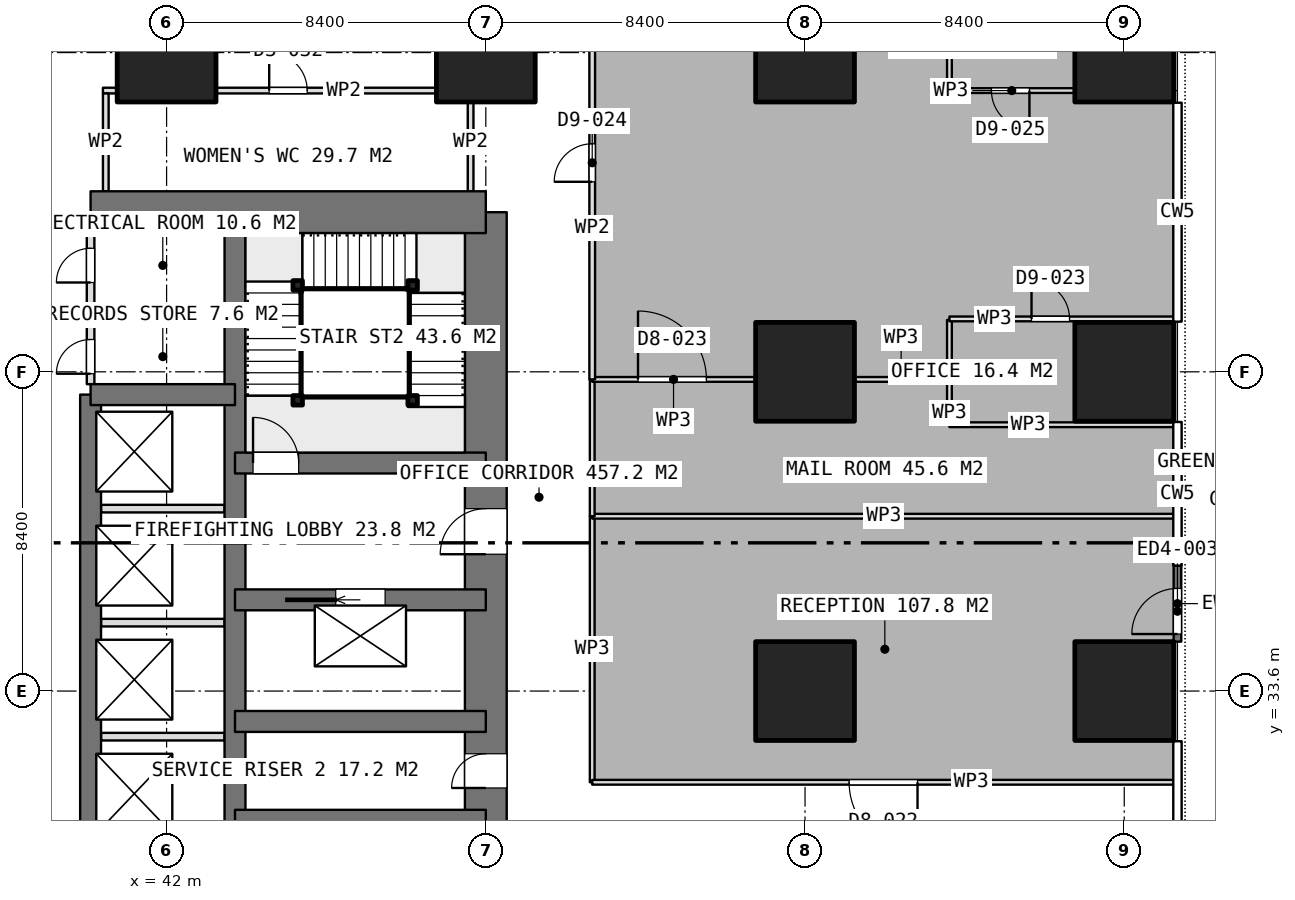
"""IFC4 building model, lengths in metres.
Left out: names, types, materials, properties, quantities, classifications, styles, units other than length and angle.
Written with IfcOpenShell. Run it as: python <this file> out.ifc"""

import sys

from ifc_helpers import new_model, si_unit, direction, frame, frame_2d, origin, origin_2d, place, context, subcontext, project, spatial, rectangle, extrude, element, fill, save


model = new_model("IFC4")
c1 = context("Model", 3, precision=1e-05, world=origin(), true_north=direction((0.0, 1.0)))
c2 = subcontext(c1, "Body", "Model", "MODEL_VIEW")
j1 = project(units=[si_unit("LENGTHUNIT", "METRE"), si_unit("PLANEANGLEUNIT", "RADIAN")], contexts=[c1])
p1 = place(None, origin())
s1 = spatial("IfcSite", under=j1, at=p1, CompositionType="ELEMENT")
p2 = place(p1, origin())
s2 = spatial("IfcBuilding", under=s1, at=p2, CompositionType="ELEMENT")
p3 = place(p2, frame((0.0, 0.0, 25.4)))
s3 = spatial("IfcBuildingStorey", under=s2, at=p3, CompositionType="ELEMENT", Elevation=25.4)
p4 = place(p3, frame((40.0, 46.2, 0.0), z_axis=(0.0, 0.0, 1.0), x_axis=(1.0, 0.0, 0.0)))
e1 = element("IfcWall", 1, at=p4, inside=s3, PredefinedType="SHEAR", context=c2, shape_type="SweptSolid", body=[
    extrude(rectangle(XDim=10.4, YDim=1.1, at=frame_2d((5.2, 0.0))), origin(), (0.0, 0.0, 1.0), 3.75),
])
p5 = place(p3, frame((50.4, 21.0, 0.0), z_axis=(0.0, 0.0, 1.0), x_axis=(0.0, 1.0, 0.0)))
e2 = element("IfcWall", 2, at=p5, inside=s3, PredefinedType="SHEAR", context=c2, shape_type="SweptSolid", body=[
    extrude(rectangle(XDim=25.2, YDim=1.1, at=frame_2d((12.6, 0.0))), origin(), (0.0, 0.0, 1.0), 3.75),
])
p6 = place(p5, frame((16.2, 0.0, 0.0)))
e3 = element("IfcOpeningElement", 3, at=p6, cuts=e2, PredefinedType="OPENING", context=c2, shape_type="SweptSolid", body=[
    extrude(rectangle(XDim=1.2, YDim=2.1, at=frame_2d((0.6, 1.05))), frame((0.0, 0.56, 0.0), z_axis=(0.0, -1.0, 0.0), x_axis=(1.0, 0.0, 0.0)), (0.0, 0.0, 1.0), 1.12),
])
p7 = place(p5, frame((10.05, 0.0, 0.0)))
e4 = element("IfcOpeningElement", 4, at=p7, cuts=e2, PredefinedType="OPENING", context=c2, shape_type="SweptSolid", body=[
    extrude(rectangle(XDim=0.9, YDim=2.1, at=frame_2d((0.45, 1.05))), frame((0.0, 0.56, 0.0), z_axis=(0.0, -1.0, 0.0), x_axis=(1.0, 0.0, 0.0)), (0.0, 0.0, 1.0), 1.12),
])
p8 = place(p5, frame((7.45, 0.0, 0.0)))
e5 = element("IfcOpeningElement", 5, at=p8, cuts=e2, PredefinedType="OPENING", context=c2, shape_type="SweptSolid", body=[
    extrude(rectangle(XDim=0.9, YDim=2.1, at=frame_2d((0.45, 1.05))), frame((0.0, 0.56, 0.0), z_axis=(0.0, -1.0, 0.0), x_axis=(1.0, 0.0, 0.0)), (0.0, 0.0, 1.0), 1.12),
])
p9 = place(p5, frame((0.75, 0.0, 0.0)))
e6 = element("IfcOpeningElement", 6, at=p9, cuts=e2, PredefinedType="OPENING", context=c2, shape_type="SweptSolid", body=[
    extrude(rectangle(XDim=1.2, YDim=2.1, at=frame_2d((0.6, 1.05))), frame((0.0, 0.56, 0.0), z_axis=(0.0, -1.0, 0.0), x_axis=(1.0, 0.0, 0.0)), (0.0, 0.0, 1.0), 1.12),
])
p10 = place(p3, frame((43.8, 21.0, 0.0), z_axis=(0.0, 0.0, 1.0), x_axis=(0.0, 1.0, 0.0)))
e7 = element("IfcWall", 7, at=p10, inside=s3, PredefinedType="SHEAR", context=c2, shape_type="SweptSolid", body=[
    extrude(rectangle(XDim=25.2, YDim=0.55, at=frame_2d((12.6, 0.0))), origin(), (0.0, 0.0, 1.0), 3.75),
])
p11 = place(p3, frame((40.0, 23.4, 0.0), z_axis=(0.0, 0.0, 1.0), x_axis=(0.0, 1.0, 0.0)))
e8 = element("IfcWall", 8, at=p11, inside=s3, PredefinedType="SHEAR", context=c2, shape_type="SweptSolid", body=[
    extrude(rectangle(XDim=18.0, YDim=0.55, at=frame_2d((9.0, 0.0))), origin(), (0.0, 0.0, 1.0), 3.75),
])
p12 = place(p3, frame((40.0, 41.4, 0.0), z_axis=(0.0, 0.0, 1.0), x_axis=(1.0, 0.0, 0.0)))
e9 = element("IfcWall", 9, at=p12, inside=s3, PredefinedType="SHEAR", context=c2, shape_type="SweptSolid", body=[
    extrude(rectangle(XDim=3.8, YDim=0.55, at=frame_2d((1.9, 0.0))), origin(), (0.0, 0.0, 1.0), 3.75),
])
for number, where, z_axis, x_axis in (
    (10, (43.8, 30.2, 0.0), (0.0, 0.0, 1.0), (1.0, 0.0, 0.0)),
    (11, (43.8, 32.8, 0.0), (0.0, 0.0, 1.0), (1.0, 0.0, 0.0)),
):
    element("IfcWall", number, at=place(p3, frame(where, z_axis=z_axis, x_axis=x_axis)), inside=s3, PredefinedType="SHEAR", context=c2, shape_type="SweptSolid", body=[
        extrude(rectangle(XDim=6.6, YDim=0.55, at=frame_2d((3.3, 0.0))), origin(), (0.0, 0.0, 1.0), 3.75),
    ])
p13 = place(p3, frame((43.8, 36.0, 0.0), z_axis=(0.0, 0.0, 1.0), x_axis=(1.0, 0.0, 0.0)))
e12 = element("IfcWall", 12, at=p13, inside=s3, PredefinedType="SHEAR", context=c2, shape_type="SweptSolid", body=[
    extrude(rectangle(XDim=6.6, YDim=0.55, at=frame_2d((3.3, 0.0))), origin(), (0.0, 0.0, 1.0), 3.75),
])
p14 = place(p13, frame((2.65, 0.0, 0.0)))
e13 = element("IfcOpeningElement", 13, at=p14, cuts=e12, PredefinedType="OPENING", context=c2, shape_type="SweptSolid", body=[
    extrude(rectangle(XDim=1.3, YDim=2.1, at=frame_2d((0.65, 1.05))), frame((0.0, 0.285, 0.0), z_axis=(0.0, -1.0, 0.0), x_axis=(1.0, 0.0, 0.0)), (0.0, 0.0, 1.0), 0.57),
])
p15 = place(p3, frame((43.8, 39.6, 0.0), z_axis=(0.0, 0.0, 1.0), x_axis=(1.0, 0.0, 0.0)))
e14 = element("IfcWall", 14, at=p15, inside=s3, PredefinedType="SHEAR", context=c2, shape_type="SweptSolid", body=[
    extrude(rectangle(XDim=6.6, YDim=0.55, at=frame_2d((3.3, 0.0))), origin(), (0.0, 0.0, 1.0), 3.75),
])
p16 = place(p15, frame((0.475, 0.0, 0.0)))
e15 = element("IfcOpeningElement", 15, at=p16, cuts=e14, PredefinedType="OPENING", context=c2, shape_type="SweptSolid", body=[
    extrude(rectangle(XDim=1.2, YDim=2.1, at=frame_2d((0.6, 1.05))), frame((0.0, 0.285, 0.0), z_axis=(0.0, -1.0, 0.0), x_axis=(1.0, 0.0, 0.0)), (0.0, 0.0, 1.0), 0.57),
])
for number, where, z_axis, x_axis in (
    (16, (42.0, 50.4, 0.0), (0.0, 0.0, 1.0), (1.0, 0.0, 0.0)),
    (17, (50.4, 50.4, 0.0), (0.0, 0.0, 1.0), (1.0, 0.0, 0.0)),
    (18, (58.8, 33.6, 0.0), (0.0, 0.0, 1.0), (1.0, 0.0, 0.0)),
    (19, (58.8, 42.0, 0.0), (0.0, 0.0, 1.0), (1.0, 0.0, 0.0)),
    (20, (58.8, 50.4, 0.0), (0.0, 0.0, 1.0), (1.0, 0.0, 0.0)),
    (21, (67.2, 33.6, 0.0), (0.0, 0.0, 1.0), (1.0, 0.0, 0.0)),
    (22, (67.2, 42.0, 0.0), (0.0, 0.0, 1.0), (1.0, 0.0, 0.0)),
    (23, (67.2, 50.4, 0.0), (0.0, 0.0, 1.0), (1.0, 0.0, 0.0)),
):
    element("IfcColumn", number, at=place(p3, frame(where, z_axis=z_axis, x_axis=x_axis)), inside=s3, PredefinedType="COLUMN", context=c2, shape_type="SweptSolid", body=[
        extrude(rectangle(XDim=2.6, YDim=2.6, at=origin_2d()), origin(), (0.0, 0.0, 1.0), 3.75),
    ])
p17 = place(p3, frame((68.6, 34.901, 0.0), z_axis=(0.0, 0.0, 1.0), x_axis=(0.0, 1.0, 0.0)))
e24 = element("IfcWall", 24, at=p17, inside=s3, PredefinedType="SOLIDWALL", context=c2, shape_type="SweptSolid", body=[
    extrude(rectangle(XDim=1.999, YDim=0.2, at=frame_2d((1.0, 0.0))), origin(), (0.0, 0.0, 1.0), 3.5),
])
p18 = place(p17, frame((0.199, 0.0, 0.0)))
e25 = element("IfcOpeningElement", 25, at=p18, cuts=e24, PredefinedType="OPENING", context=c2, shape_type="SweptSolid", body=[
    extrude(rectangle(XDim=1.2, YDim=2.4, at=frame_2d((0.6, 1.2))), frame((0.0, 0.11, 0.0), z_axis=(0.0, -1.0, 0.0), x_axis=(1.0, 0.0, 0.0)), (0.0, 0.0, 1.0), 0.22),
])
for number, where, z_axis, x_axis in (
    (26, (40.275, 32.4, 0.0), (0.0, 0.0, 1.0), (1.0, 0.0, 0.0)),
    (27, (40.275, 35.4, 0.0), (0.0, 0.0, 1.0), (1.0, 0.0, 0.0)),
    (28, (40.275, 38.4, 0.0), (0.0, 0.0, 1.0), (1.0, 0.0, 0.0)),
):
    element("IfcWall", number, at=place(p3, frame(where, z_axis=z_axis, x_axis=x_axis)), inside=s3, PredefinedType="PARTITIONING", context=c2, shape_type="SweptSolid", body=[
        extrude(rectangle(XDim=3.25, YDim=0.2, at=frame_2d((1.625, 0.0))), origin(), (0.0, 0.0, 1.0), 3.5),
    ])
p19 = place(p3, frame((40.0, 41.675, 0.0), z_axis=(0.0, 0.0, 1.0), x_axis=(0.0, 1.0, 0.0)))
e29 = element("IfcWall", 29, at=p19, inside=s3, PredefinedType="PARTITIONING", context=c2, shape_type="SweptSolid", body=[
    extrude(rectangle(XDim=3.975, YDim=0.2, at=frame_2d((1.987, 0.0))), origin(), (0.0, 0.0, 1.0), 3.5),
])
p20 = place(p19, frame((2.675, 0.0, 0.0)))
e30 = element("IfcOpeningElement", 30, at=p20, cuts=e29, PredefinedType="OPENING", context=c2, shape_type="SweptSolid", body=[
    extrude(rectangle(XDim=0.9, YDim=2.1, at=frame_2d((0.45, 1.05))), frame((0.0, 0.11, 0.0), z_axis=(0.0, -1.0, 0.0), x_axis=(1.0, 0.0, 0.0)), (0.0, 0.0, 1.0), 0.22),
])
p21 = place(p19, frame((0.275, 0.0, 0.0)))
e31 = element("IfcOpeningElement", 31, at=p21, cuts=e29, PredefinedType="OPENING", context=c2, shape_type="SweptSolid", body=[
    extrude(rectangle(XDim=0.9, YDim=2.1, at=frame_2d((0.45, 1.05))), frame((0.0, 0.11, 0.0), z_axis=(0.0, -1.0, 0.0), x_axis=(1.0, 0.0, 0.0)), (0.0, 0.0, 1.0), 0.22),
])
p22 = place(p3, frame((40.0, 43.4, 0.0), z_axis=(0.0, 0.0, 1.0), x_axis=(1.0, 0.0, 0.0)))
e32 = element("IfcWall", 32, at=p22, inside=s3, PredefinedType="PARTITIONING", context=c2, shape_type="SweptSolid", body=[
    extrude(rectangle(XDim=3.525, YDim=0.2, at=frame_2d((1.762, 0.0))), origin(), (0.0, 0.0, 1.0), 3.5),
])
p23 = place(p3, frame((40.325, 49.4, 0.0), z_axis=(0.0, 0.0, 1.0), x_axis=(1.0, 0.0, 0.0)))
e33 = element("IfcWall", 33, at=p23, inside=s3, PredefinedType="PARTITIONING", context=c2, shape_type="SweptSolid", body=[
    extrude(rectangle(XDim=9.75, YDim=0.15, at=frame_2d((4.875, 0.0))), origin(), (0.0, 0.0, 1.0), 3.5),
])
p24 = place(p23, frame((4.375, 0.0, 0.0)))
e34 = element("IfcOpeningElement", 34, at=p24, cuts=e33, PredefinedType="OPENING", context=c2, shape_type="SweptSolid", body=[
    extrude(rectangle(XDim=1.0, YDim=2.1, at=frame_2d((0.5, 1.05))), frame((0.0, 0.085, 0.0), z_axis=(0.0, -1.0, 0.0), x_axis=(1.0, 0.0, 0.0)), (0.0, 0.0, 1.0), 0.17),
])
for number, where, z_axis, x_axis in (
    (35, (40.4, 46.75, 0.0), (0.0, 0.0, 1.0), (0.0, 1.0, 0.0)),
    (36, (50.0, 46.75, 0.0), (0.0, 0.0, 1.0), (0.0, 1.0, 0.0)),
):
    element("IfcWall", number, at=place(p3, frame(where, z_axis=z_axis, x_axis=x_axis)), inside=s3, PredefinedType="PARTITIONING", context=c2, shape_type="SweptSolid", body=[
        extrude(rectangle(XDim=2.575, YDim=0.15, at=frame_2d((1.288, 0.0))), origin(), (0.0, 0.0, 1.0), 3.5),
    ])
p25 = place(p3, frame((68.52, 40.608, 0.0), z_axis=(0.0, 0.0, 1.0), x_axis=(-1.0, 0.0, 0.0)))
e37 = element("IfcWall", 37, at=p25, inside=s3, PredefinedType="PARTITIONING", context=c2, shape_type="SweptSolid", body=[
    extrude(rectangle(XDim=5.92, YDim=0.125, at=frame_2d((2.96, 0.0))), origin(), (0.0, 0.0, 1.0), 3.5),
])
p26 = place(p3, frame((62.6, 40.636, 0.0), z_axis=(0.0, 0.0, 1.0), x_axis=(0.0, 1.0, 0.0)))
e38 = element("IfcWall", 38, at=p26, inside=s3, PredefinedType="PARTITIONING", context=c2, shape_type="SweptSolid", body=[
    extrude(rectangle(XDim=2.729, YDim=0.125, at=frame_2d((1.365, 0.0))), origin(), (0.0, 0.0, 1.0), 3.5),
])
p27 = place(p3, frame((62.6, 43.392, 0.0), z_axis=(0.0, 0.0, 1.0), x_axis=(1.0, 0.0, 0.0)))
e39 = element("IfcWall", 39, at=p27, inside=s3, PredefinedType="PARTITIONING", context=c2, shape_type="SweptSolid", body=[
    extrude(rectangle(XDim=5.92, YDim=0.125, at=frame_2d((2.96, 0.0))), origin(), (0.0, 0.0, 1.0), 3.5),
])
p28 = place(p27, frame((2.16, 0.0, 0.0)))
e40 = element("IfcOpeningElement", 40, at=p28, cuts=e39, PredefinedType="OPENING", context=c2, shape_type="SweptSolid", body=[
    extrude(rectangle(XDim=1.0, YDim=2.1, at=frame_2d((0.5, 1.05))), frame((0.0, 0.073, 0.0), z_axis=(0.0, -1.0, 0.0), x_axis=(1.0, 0.0, 0.0)), (0.0, 0.0, 1.0), 0.145),
])
p29 = place(p3, frame((65.88, 49.4, 0.0), z_axis=(0.0, 0.0, 1.0), x_axis=(-1.0, 0.0, 0.0)))
e41 = element("IfcWall", 41, at=p29, inside=s3, PredefinedType="PARTITIONING", context=c2, shape_type="SweptSolid", body=[
    extrude(rectangle(XDim=3.28, YDim=0.125, at=frame_2d((1.64, 0.0))), origin(), (0.0, 0.0, 1.0), 3.5),
])
p30 = place(p29, frame((1.175, 0.0, 0.0)))
e42 = element("IfcOpeningElement", 42, at=p30, cuts=e41, PredefinedType="OPENING", context=c2, shape_type="SweptSolid", body=[
    extrude(rectangle(XDim=1.0, YDim=2.1, at=frame_2d((0.5, 1.05))), frame((0.0, 0.073, 0.0), z_axis=(0.0, -1.0, 0.0), x_axis=(1.0, 0.0, 0.0)), (0.0, 0.0, 1.0), 0.145),
])
p31 = place(p3, frame((62.6, 49.4, 0.0), z_axis=(0.0, 0.0, 1.0), x_axis=(0.0, 1.0, 0.0)))
e43 = element("IfcWall", 43, at=p31, inside=s3, PredefinedType="PARTITIONING", context=c2, shape_type="SweptSolid", body=[
    extrude(rectangle(XDim=2.365, YDim=0.125, at=frame_2d((1.183, 0.0))), origin(), (0.0, 0.0, 1.0), 3.5),
])
p32 = place(p3, frame((53.2, 31.2, 0.0), z_axis=(0.0, 0.0, 1.0), x_axis=(0.0, 1.0, 0.0)))
e44 = element("IfcWall", 44, at=p32, inside=s3, PredefinedType="PARTITIONING", context=c2, shape_type="SweptSolid", body=[
    extrude(rectangle(XDim=7.0, YDim=0.125, at=frame_2d((3.5, 0.0))), origin(), (0.0, 0.0, 1.0), 3.5),
])
p33 = place(p3, frame((53.2, 38.2, 0.0), z_axis=(0.0, 0.0, 1.0), x_axis=(1.0, 0.0, 0.0)))
e45 = element("IfcWall", 45, at=p33, inside=s3, PredefinedType="PARTITIONING", context=c2, shape_type="SweptSolid", body=[
    extrude(rectangle(XDim=15.35, YDim=0.125, at=frame_2d((7.675, 0.0))), origin(), (0.0, 0.0, 1.0), 3.5),
])
p34 = place(p3, frame((68.55, 31.2, 0.0), z_axis=(0.0, 0.0, 1.0), x_axis=(-1.0, 0.0, 0.0)))
e46 = element("IfcWall", 46, at=p34, inside=s3, PredefinedType="PARTITIONING", context=c2, shape_type="SweptSolid", body=[
    extrude(rectangle(XDim=15.35, YDim=0.125, at=frame_2d((7.675, 0.0))), origin(), (0.0, 0.0, 1.0), 3.5),
])
p35 = place(p34, frame((6.79, 0.0, 0.0)))
e47 = element("IfcOpeningElement", 47, at=p35, cuts=e46, PredefinedType="OPENING", context=c2, shape_type="SweptSolid", body=[
    extrude(rectangle(XDim=1.8, YDim=2.1, at=frame_2d((0.9, 1.05))), frame((0.0, 0.073, 0.0), z_axis=(0.0, -1.0, 0.0), x_axis=(1.0, 0.0, 0.0)), (0.0, 0.0, 1.0), 0.145),
])
p36 = place(p3, frame((53.2, 38.2, 0.0), z_axis=(0.0, 0.0, 1.0), x_axis=(0.0, 1.0, 0.0)))
e48 = element("IfcWall", 48, at=p36, inside=s3, PredefinedType="PARTITIONING", context=c2, shape_type="SweptSolid", body=[
    extrude(rectangle(XDim=3.6, YDim=0.125, at=frame_2d((1.8, 0.0))), origin(), (0.0, 0.0, 1.0), 3.5),
])
p37 = place(p3, frame((53.2, 41.8, 0.0), z_axis=(0.0, 0.0, 1.0), x_axis=(1.0, 0.0, 0.0)))
e49 = element("IfcWall", 49, at=p37, inside=s3, PredefinedType="PARTITIONING", context=c2, shape_type="SweptSolid", body=[
    extrude(rectangle(XDim=4.28, YDim=0.125, at=frame_2d((2.14, 0.0))), origin(), (0.0, 0.0, 1.0), 3.5),
])
p38 = place(p37, frame((1.205, 0.0, 0.0)))
e50 = element("IfcOpeningElement", 50, at=p38, cuts=e49, PredefinedType="OPENING", context=c2, shape_type="SweptSolid", body=[
    extrude(rectangle(XDim=1.8, YDim=2.1, at=frame_2d((0.9, 1.05))), frame((0.0, 0.073, 0.0), z_axis=(0.0, -1.0, 0.0), x_axis=(1.0, 0.0, 0.0)), (0.0, 0.0, 1.0), 0.145),
])
p39 = place(p3, frame((60.12, 41.8, 0.0), z_axis=(0.0, 0.0, 1.0), x_axis=(1.0, 0.0, 0.0)))
e51 = element("IfcWall", 51, at=p39, inside=s3, PredefinedType="PARTITIONING", context=c2, shape_type="SweptSolid", body=[
    extrude(rectangle(XDim=2.418, YDim=0.125, at=frame_2d((1.209, 0.0))), origin(), (0.0, 0.0, 1.0), 3.5),
])
p40 = place(p3, frame((53.2, 41.8, 0.0), z_axis=(0.0, 0.0, 1.0), x_axis=(0.0, 1.0, 0.0)))
e52 = element("IfcWall", 52, at=p40, inside=s3, PredefinedType="PARTITIONING", context=c2, shape_type="SweptSolid", body=[
    extrude(rectangle(XDim=11.4, YDim=0.15, at=frame_2d((5.7, 0.0))), origin(), (0.0, 0.0, 1.0), 3.5),
])
p41 = place(p40, frame((5.2, 0.0, 0.0)))
e53 = element("IfcOpeningElement", 53, at=p41, cuts=e52, PredefinedType="OPENING", context=c2, shape_type="SweptSolid", body=[
    extrude(rectangle(XDim=1.0, YDim=2.1, at=frame_2d((0.5, 1.05))), frame((0.0, 0.085, 0.0), z_axis=(0.0, -1.0, 0.0), x_axis=(1.0, 0.0, 0.0)), (0.0, 0.0, 1.0), 0.17),
])
for number, where, z_axis, x_axis in (
    (54, (45.45, 41.25, 0.0), (0.0, 0.0, 1.0), (1.0, 0.0, 0.0)),
    (55, (45.45, 44.275, 0.0), (0.0, 0.0, 1.0), (1.0, 0.0, 0.0)),
    (56, (48.475, 44.275, 0.0), (0.0, 0.0, 1.0), (1.0, 0.0, 0.0)),
    (57, (48.475, 41.25, 0.0), (0.0, 0.0, 1.0), (1.0, 0.0, 0.0)),
):
    element("IfcColumn", number, at=place(p3, frame(where, z_axis=z_axis, x_axis=x_axis)), inside=s3, PredefinedType="COLUMN", context=c2, shape_type="SweptSolid", body=[
        extrude(rectangle(XDim=0.25, YDim=0.25, at=origin_2d()), origin(), (0.0, 0.0, 1.0), 3.75),
    ])
p42 = place(p18, origin())
e58 = element("IfcDoor", 58, at=p42, inside=s3, OperationType="SINGLE_SWING_LEFT", PredefinedType="DOOR", context=c2, shape_type="SweptSolid", body=[
    extrude(rectangle(XDim=1.2, YDim=2.4, at=frame_2d((0.6, 1.2))), frame((0.0, 0.025, 0.0), z_axis=(0.0, -1.0, 0.0), x_axis=(1.0, 0.0, 0.0)), (0.0, 0.0, 1.0), 0.05),
])
fill(e25, e58)
p43 = place(p6, origin())
e59 = element("IfcDoor", 59, at=p43, inside=s3, OperationType="SINGLE_SWING_LEFT", PredefinedType="DOOR", context=c2, shape_type="SweptSolid", body=[
    extrude(rectangle(XDim=1.2, YDim=2.1, at=frame_2d((0.6, 1.05))), frame((0.0, 0.025, 0.0), z_axis=(0.0, -1.0, 0.0), x_axis=(1.0, 0.0, 0.0)), (0.0, 0.0, 1.0), 0.05),
])
fill(e3, e59)
p44 = place(p7, origin())
e60 = element("IfcDoor", 60, at=p44, inside=s3, OperationType="SINGLE_SWING_LEFT", PredefinedType="DOOR", context=c2, shape_type="SweptSolid", body=[
    extrude(rectangle(XDim=0.9, YDim=2.1, at=frame_2d((0.45, 1.05))), frame((0.0, 0.025, 0.0), z_axis=(0.0, -1.0, 0.0), x_axis=(1.0, 0.0, 0.0)), (0.0, 0.0, 1.0), 0.05),
])
fill(e4, e60)
p45 = place(p20, origin())
e61 = element("IfcDoor", 61, at=p45, inside=s3, OperationType="SINGLE_SWING_LEFT", PredefinedType="DOOR", context=c2, shape_type="SweptSolid", body=[
    extrude(rectangle(XDim=0.9, YDim=2.1, at=frame_2d((0.45, 1.05))), frame((0.0, 0.025, 0.0), z_axis=(0.0, -1.0, 0.0), x_axis=(1.0, 0.0, 0.0)), (0.0, 0.0, 1.0), 0.05),
])
fill(e30, e61)
p46 = place(p21, origin())
e62 = element("IfcDoor", 62, at=p46, inside=s3, OperationType="SINGLE_SWING_LEFT", PredefinedType="DOOR", context=c2, shape_type="SweptSolid", body=[
    extrude(rectangle(XDim=0.9, YDim=2.1, at=frame_2d((0.45, 1.05))), frame((0.0, 0.025, 0.0), z_axis=(0.0, -1.0, 0.0), x_axis=(1.0, 0.0, 0.0)), (0.0, 0.0, 1.0), 0.05),
])
fill(e31, e62)
p47 = place(p14, origin())
e63 = element("IfcDoor", 63, at=p47, inside=s3, OperationType="SLIDING_TO_LEFT", PredefinedType="USERDEFINED", context=c2, shape_type="SweptSolid", body=[
    extrude(rectangle(XDim=1.3, YDim=2.1, at=frame_2d((0.65, 1.05))), frame((0.0, 0.025, 0.0), z_axis=(0.0, -1.0, 0.0), x_axis=(1.0, 0.0, 0.0)), (0.0, 0.0, 1.0), 0.05),
])
fill(e13, e63)
p48 = place(p24, origin())
e64 = element("IfcDoor", 64, at=p48, inside=s3, OperationType="SINGLE_SWING_LEFT", PredefinedType="DOOR", context=c2, shape_type="SweptSolid", body=[
    extrude(rectangle(XDim=1.0, YDim=2.1, at=frame_2d((0.5, 1.05))), frame((0.0, 0.025, 0.0), z_axis=(0.0, -1.0, 0.0), x_axis=(1.0, 0.0, 0.0)), (0.0, 0.0, 1.0), 0.05),
])
fill(e34, e64)
p49 = place(p28, origin())
e65 = element("IfcDoor", 65, at=p49, inside=s3, OperationType="SINGLE_SWING_LEFT", PredefinedType="DOOR", context=c2, shape_type="SweptSolid", body=[
    extrude(rectangle(XDim=1.0, YDim=2.1, at=frame_2d((0.5, 1.05))), frame((0.0, 0.025, 0.0), z_axis=(0.0, -1.0, 0.0), x_axis=(1.0, 0.0, 0.0)), (0.0, 0.0, 1.0), 0.05),
])
fill(e40, e65)
p50 = place(p30, origin())
e66 = element("IfcDoor", 66, at=p50, inside=s3, OperationType="SINGLE_SWING_LEFT", PredefinedType="DOOR", context=c2, shape_type="SweptSolid", body=[
    extrude(rectangle(XDim=1.0, YDim=2.1, at=frame_2d((0.5, 1.05))), frame((0.0, 0.025, 0.0), z_axis=(0.0, -1.0, 0.0), x_axis=(1.0, 0.0, 0.0)), (0.0, 0.0, 1.0), 0.05),
])
fill(e42, e66)
p51 = place(p35, origin())
e67 = element("IfcDoor", 67, at=p51, inside=s3, OperationType="DOUBLE_DOOR_SINGLE_SWING", PredefinedType="DOOR", context=c2, shape_type="SweptSolid", body=[
    extrude(rectangle(XDim=1.8, YDim=2.1, at=frame_2d((0.9, 1.05))), frame((0.0, 0.025, 0.0), z_axis=(0.0, -1.0, 0.0), x_axis=(1.0, 0.0, 0.0)), (0.0, 0.0, 1.0), 0.05),
])
fill(e47, e67)
p52 = place(p38, origin())
e68 = element("IfcDoor", 68, at=p52, inside=s3, OperationType="DOUBLE_DOOR_SINGLE_SWING", PredefinedType="DOOR", context=c2, shape_type="SweptSolid", body=[
    extrude(rectangle(XDim=1.8, YDim=2.1, at=frame_2d((0.9, 1.05))), frame((0.0, 0.025, 0.0), z_axis=(0.0, -1.0, 0.0), x_axis=(1.0, 0.0, 0.0)), (0.0, 0.0, 1.0), 0.05),
])
fill(e50, e68)
p53 = place(p41, origin())
e69 = element("IfcDoor", 69, at=p53, inside=s3, OperationType="SINGLE_SWING_LEFT", PredefinedType="DOOR", context=c2, shape_type="SweptSolid", body=[
    extrude(rectangle(XDim=1.0, YDim=2.1, at=frame_2d((0.5, 1.05))), frame((0.0, 0.025, 0.0), z_axis=(0.0, -1.0, 0.0), x_axis=(1.0, 0.0, 0.0)), (0.0, 0.0, 1.0), 0.05),
])
fill(e53, e69)
p54 = place(p16, origin())
e70 = element("IfcDoor", 70, at=p54, inside=s3, OperationType="SINGLE_SWING_RIGHT", PredefinedType="DOOR", context=c2, shape_type="SweptSolid", body=[
    extrude(rectangle(XDim=1.2, YDim=2.1, at=frame_2d((0.6, 1.05))), frame((0.0, 0.025, 0.0), z_axis=(0.0, -1.0, 0.0), x_axis=(1.0, 0.0, 0.0)), (0.0, 0.0, 1.0), 0.05),
])
fill(e15, e70)
save(model, sys.argv[1])
